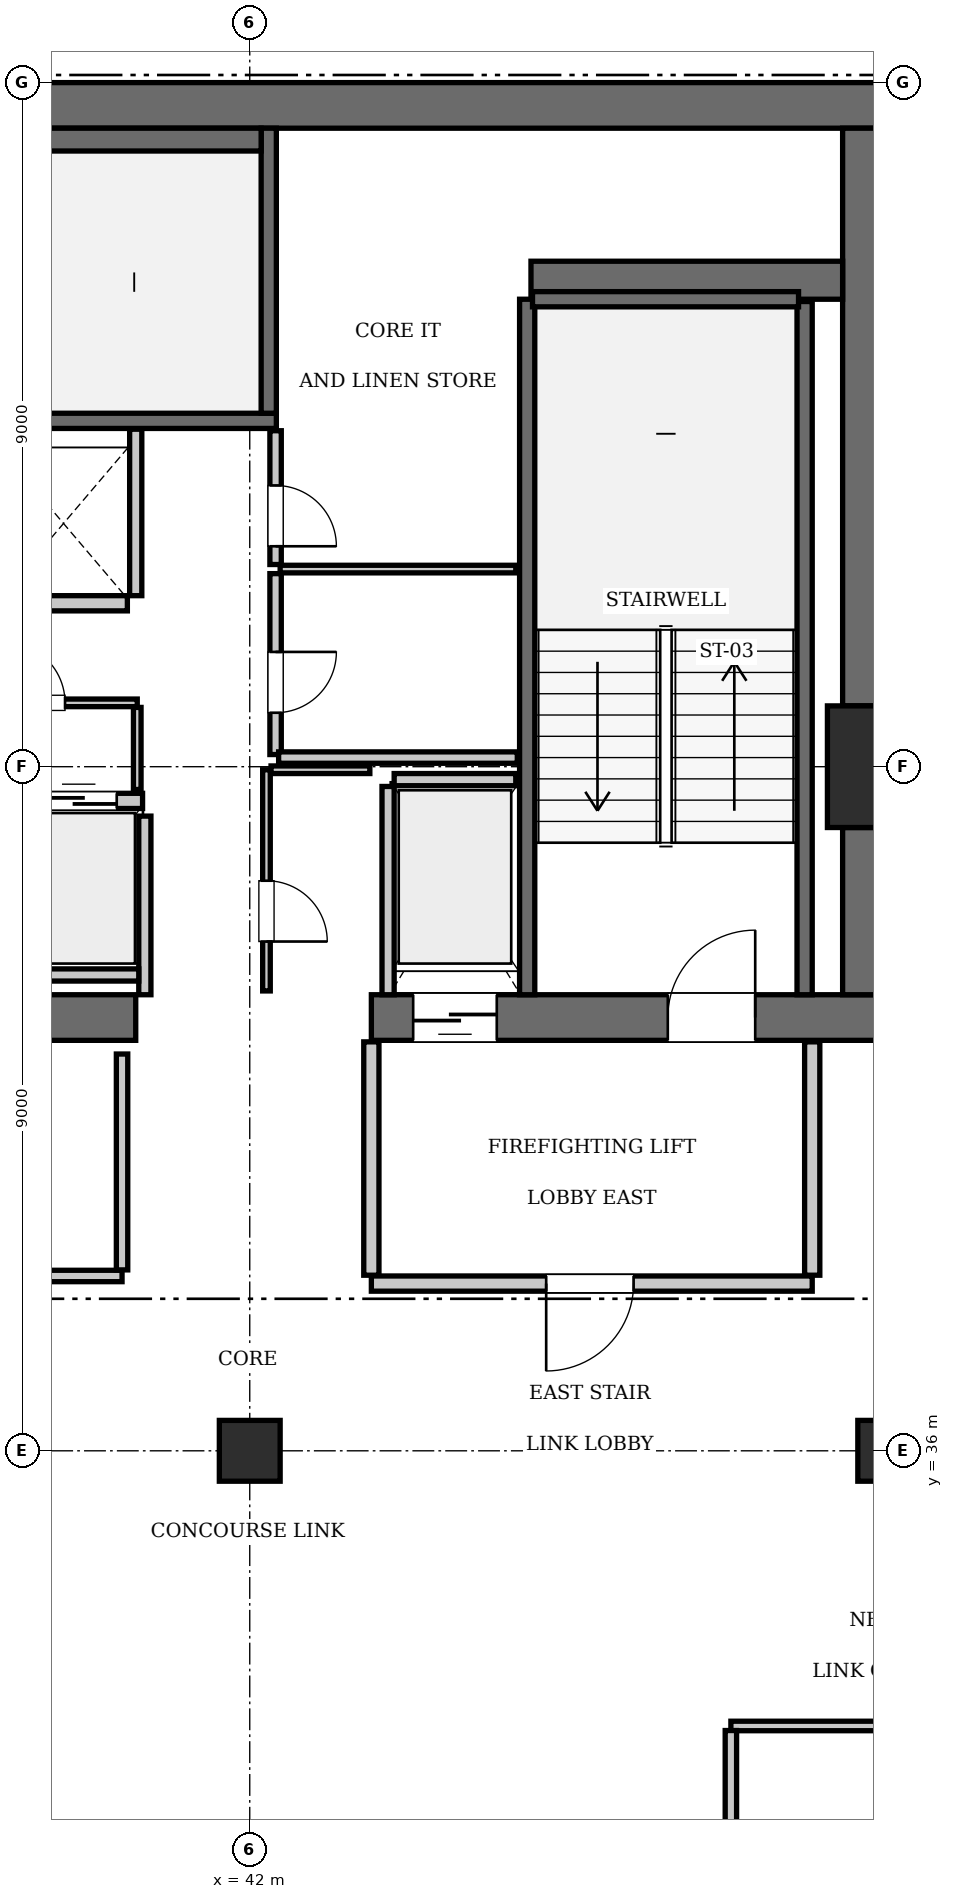
"""IFC4 building model, lengths in metres.
Left out: names, types, materials, properties, quantities, classifications, styles, units other than length and angle.
Written with IfcOpenShell. Run it as: python <this file> out.ifc"""

import sys

from ifc_helpers import new_model, si_unit, direction, frame, frame_2d, origin, origin_2d, place, context, subcontext, project, spatial, rectangle, extrude, element, fill, save


model = new_model("IFC4")
c1 = context("Model", 3, precision=1e-05, world=origin(), true_north=direction((0.0, 1.0)))
c2 = subcontext(c1, "Body", "Model", "MODEL_VIEW")
j1 = project(units=[si_unit("LENGTHUNIT", "METRE"), si_unit("PLANEANGLEUNIT", "RADIAN")], contexts=[c1])
p1 = place(None, origin())
s1 = spatial("IfcSite", under=j1, at=p1, CompositionType="ELEMENT")
p2 = place(p1, origin())
s2 = spatial("IfcBuilding", under=s1, at=p2, CompositionType="ELEMENT")
p3 = place(p2, frame((0.0, 0.0, 266.35)))
s3 = spatial("IfcBuildingStorey", under=s2, at=p3, CompositionType="ELEMENT", Elevation=266.35)
p4 = place(p3, frame((50.4, 45.0, 0.0), z_axis=(0.0, 0.0, 1.0), x_axis=(1.0, 0.0, 0.0)))
e1 = element("IfcColumn", 1, at=p4, inside=s3, PredefinedType="COLUMN", context=c2, shape_type="SweptSolid", body=[
    extrude(rectangle(XDim=1.6, YDim=1.6, at=origin_2d()), origin(), (0.0, 0.0, 1.0), 3.85),
])
p5 = place(p3, frame((25.2, 53.7, 0.0), z_axis=(0.0, 0.0, 1.0), x_axis=(1.0, 0.0, 0.0)))
e2 = element("IfcWall", 2, at=p5, inside=s3, PredefinedType="SHEAR", context=c2, shape_type="SweptSolid", body=[
    extrude(rectangle(XDim=25.2, YDim=0.6, at=frame_2d((12.6, 0.0))), origin(), (0.0, 0.0, 1.0), 3.85),
])
p6 = place(p3, frame((35.1, 41.7, 0.0), z_axis=(0.0, 0.0, 1.0), x_axis=(1.0, 0.0, 0.0)))
e3 = element("IfcWall", 3, at=p6, inside=s3, PredefinedType="SHEAR", context=c2, shape_type="SweptSolid", body=[
    extrude(rectangle(XDim=5.4, YDim=0.6, at=frame_2d((2.7, 0.0))), origin(), (0.0, 0.0, 1.0), 3.85),
])
p7 = place(p3, frame((43.6, 41.7, 0.0), z_axis=(0.0, 0.0, 1.0), x_axis=(1.0, 0.0, 0.0)))
e4 = element("IfcWall", 4, at=p7, inside=s3, PredefinedType="SHEAR", context=c2, shape_type="SweptSolid", body=[
    extrude(rectangle(XDim=6.8, YDim=0.6, at=frame_2d((3.4, 0.0))), origin(), (0.0, 0.0, 1.0), 3.85),
])
p8 = place(p7, frame((3.9, 0.0, 0.0)))
e5 = element("IfcOpeningElement", 5, at=p8, cuts=e4, PredefinedType="OPENING", context=c2, shape_type="SweptSolid", body=[
    extrude(rectangle(XDim=1.15, YDim=2.15, at=frame_2d((0.575, 1.075))), frame((0.0, 0.31, 0.0), z_axis=(0.0, -1.0, 0.0), x_axis=(1.0, 0.0, 0.0)), (0.0, 0.0, 1.0), 0.62),
])
p9 = place(p7, frame((0.55, 0.0, 0.0)))
e6 = element("IfcOpeningElement", 6, at=p9, cuts=e4, PredefinedType="OPENING", context=c2, shape_type="SweptSolid", body=[
    extrude(rectangle(XDim=1.1, YDim=2.2, at=frame_2d((0.55, 1.1))), frame((0.0, 0.31, 0.0), z_axis=(0.0, -1.0, 0.0), x_axis=(1.0, 0.0, 0.0)), (0.0, 0.0, 1.0), 0.62),
])
p10 = place(p3, frame((50.1, 42.0, 0.0), z_axis=(0.0, 0.0, 1.0), x_axis=(0.0, 1.0, 0.0)))
e7 = element("IfcWall", 7, at=p10, inside=s3, PredefinedType="SHEAR", context=c2, shape_type="SweptSolid", body=[
    extrude(rectangle(XDim=2.2, YDim=0.6, at=frame_2d((1.1, 0.0))), origin(), (0.0, 0.0, 1.0), 3.85),
])
p11 = place(p3, frame((50.1, 45.8, 0.0), z_axis=(0.0, 0.0, 1.0), x_axis=(0.0, 1.0, 0.0)))
e8 = element("IfcWall", 8, at=p11, inside=s3, PredefinedType="SHEAR", context=c2, shape_type="SweptSolid", body=[
    extrude(rectangle(XDim=7.6, YDim=0.6, at=frame_2d((3.8, 0.0))), origin(), (0.0, 0.0, 1.0), 3.85),
])
p12 = place(p3, frame((45.7, 51.4, 0.0), z_axis=(0.0, 0.0, 1.0), x_axis=(1.0, 0.0, 0.0)))
e9 = element("IfcWall", 9, at=p12, inside=s3, PredefinedType="SHEAR", context=c2, shape_type="SweptSolid", body=[
    extrude(rectangle(XDim=4.1, YDim=0.5, at=frame_2d((2.05, 0.0))), origin(), (0.0, 0.0, 1.0), 3.85),
])
for number, where, z_axis, x_axis in (
    (10, (42.0, 36.0, 0.0), (0.0, 0.0, 1.0), (1.0, 0.0, 0.0)),
    (11, (50.4, 36.0, 0.0), (0.0, 0.0, 1.0), (1.0, 0.0, 0.0)),
):
    element("IfcColumn", number, at=place(p3, frame(where, z_axis=z_axis, x_axis=x_axis)), inside=s3, PredefinedType="COLUMN", context=c2, shape_type="SweptSolid", body=[
        extrude(rectangle(XDim=0.8, YDim=0.8, at=origin_2d()), origin(), (0.0, 0.0, 1.0), 3.85),
    ])
p13 = place(p3, frame((33.25, 49.55, 0.0), z_axis=(0.0, 0.0, 1.0), x_axis=(1.0, 0.0, 0.0)))
e12 = element("IfcWall", 12, at=p13, inside=s3, PredefinedType="SOLIDWALL", context=c2, shape_type="SweptSolid", body=[
    extrude(rectangle(XDim=9.1, YDim=0.2, at=frame_2d((4.55, 0.0))), origin(), (0.0, 0.0, 1.0), 3.61),
])
p14 = place(p3, frame((42.25, 49.65, 0.0), z_axis=(0.0, 0.0, 1.0), x_axis=(0.0, 1.0, 0.0)))
e13 = element("IfcWall", 13, at=p14, inside=s3, PredefinedType="SOLIDWALL", context=c2, shape_type="SweptSolid", body=[
    extrude(rectangle(XDim=3.75, YDim=0.2, at=frame_2d((1.875, 0.0))), origin(), (0.0, 0.0, 1.0), 3.61),
])
p15 = place(p3, frame((33.45, 53.25, 0.0), z_axis=(0.0, 0.0, 1.0), x_axis=(1.0, 0.0, 0.0)))
e14 = element("IfcWall", 14, at=p15, inside=s3, PredefinedType="SOLIDWALL", context=c2, shape_type="SweptSolid", body=[
    extrude(rectangle(XDim=8.7, YDim=0.3, at=frame_2d((4.35, 0.0))), origin(), (0.0, 0.0, 1.0), 3.61),
])
p16 = place(p3, frame((45.65, 42.0, 0.0), z_axis=(0.0, 0.0, 1.0), x_axis=(0.0, 1.0, 0.0)))
e15 = element("IfcWall", 15, at=p16, inside=s3, PredefinedType="SOLIDWALL", context=c2, shape_type="SweptSolid", body=[
    extrude(rectangle(XDim=9.15, YDim=0.2, at=frame_2d((4.575, 0.0))), origin(), (0.0, 0.0, 1.0), 3.61),
])
p17 = place(p3, frame((49.3, 42.0, 0.0), z_axis=(0.0, 0.0, 1.0), x_axis=(0.0, 1.0, 0.0)))
e16 = element("IfcWall", 16, at=p17, inside=s3, PredefinedType="SOLIDWALL", context=c2, shape_type="SweptSolid", body=[
    extrude(rectangle(XDim=9.12, YDim=0.2, at=frame_2d((4.56, 0.0))), origin(), (0.0, 0.0, 1.0), 3.61),
])
p18 = place(p3, frame((45.72, 51.15, 0.0), z_axis=(0.0, 0.0, 1.0), x_axis=(1.0, 0.0, 0.0)))
e17 = element("IfcWall", 17, at=p18, inside=s3, PredefinedType="SOLIDWALL", context=c2, shape_type="SweptSolid", body=[
    extrude(rectangle(XDim=3.5, YDim=0.2, at=frame_2d((1.75, 0.0))), origin(), (0.0, 0.0, 1.0), 3.61),
])
p19 = place(p3, frame((38.91, 44.55, 0.0), z_axis=(0.0, 0.0, 1.0), x_axis=(1.0, 0.0, 0.0)))
e18 = element("IfcWall", 18, at=p19, inside=s3, PredefinedType="SOLIDWALL", context=c2, shape_type="SweptSolid", body=[
    extrude(rectangle(XDim=1.68, YDim=0.2, at=frame_2d((0.84, 0.0))), origin(), (0.0, 0.0, 1.0), 3.61),
])
p20 = place(p19, frame((0.34, 0.0, 0.0)))
e19 = element("IfcOpeningElement", 19, at=p20, cuts=e18, PredefinedType="OPENING", context=c2, shape_type="SweptSolid", body=[
    extrude(rectangle(XDim=1.0, YDim=2.15, at=frame_2d((0.5, 1.075))), frame((0.0, 0.11, 0.0), z_axis=(0.0, -1.0, 0.0), x_axis=(1.0, 0.0, 0.0)), (0.0, 0.0, 1.0), 0.22),
])
p21 = place(p3, frame((38.71, 47.15, 0.0), z_axis=(0.0, 0.0, 1.0), x_axis=(1.0, 0.0, 0.0)))
e20 = element("IfcWall", 20, at=p21, inside=s3, PredefinedType="SOLIDWALL", context=c2, shape_type="SweptSolid", body=[
    extrude(rectangle(XDim=1.68, YDim=0.2, at=frame_2d((0.84, 0.0))), origin(), (0.0, 0.0, 1.0), 3.61),
])
p22 = place(p3, frame((43.9, 44.83, 0.0), z_axis=(0.0, 0.0, 1.0), x_axis=(1.0, 0.0, 0.0)))
e21 = element("IfcWall", 21, at=p22, inside=s3, PredefinedType="SOLIDWALL", context=c2, shape_type="SweptSolid", body=[
    extrude(rectangle(XDim=1.6, YDim=0.16, at=frame_2d((0.8, 0.0))), origin(), (0.0, 0.0, 1.0), 3.61),
])
p23 = place(p3, frame((43.82, 42.0, 0.0), z_axis=(0.0, 0.0, 1.0), x_axis=(0.0, 1.0, 0.0)))
e22 = element("IfcWall", 22, at=p23, inside=s3, PredefinedType="SOLIDWALL", context=c2, shape_type="SweptSolid", body=[
    extrude(rectangle(XDim=2.74, YDim=0.16, at=frame_2d((1.37, 0.0))), origin(), (0.0, 0.0, 1.0), 3.61),
])
p24 = place(p3, frame((40.62, 42.0, 0.0), z_axis=(0.0, 0.0, 1.0), x_axis=(0.0, 1.0, 0.0)))
e23 = element("IfcWall", 23, at=p24, inside=s3, PredefinedType="SOLIDWALL", context=c2, shape_type="SweptSolid", body=[
    extrude(rectangle(XDim=2.35, YDim=0.16, at=frame_2d((1.175, 0.0))), origin(), (0.0, 0.0, 1.0), 3.61),
])
p25 = place(p3, frame((35.52, 42.26, 0.0), z_axis=(0.0, 0.0, 1.0), x_axis=(1.0, 0.0, 0.0)))
e24 = element("IfcWall", 24, at=p25, inside=s3, PredefinedType="SOLIDWALL", context=c2, shape_type="SweptSolid", body=[
    extrude(rectangle(XDim=5.02, YDim=0.16, at=frame_2d((2.51, 0.0))), origin(), (0.0, 0.0, 1.0), 3.61),
])
p26 = place(p3, frame((40.5, 47.25, 0.0), z_axis=(0.0, 0.0, 1.0), x_axis=(0.0, 1.0, 0.0)))
e25 = element("IfcWall", 25, at=p26, inside=s3, PredefinedType="SOLIDWALL", context=c2, shape_type="SweptSolid", body=[
    extrude(rectangle(XDim=2.19, YDim=0.16, at=frame_2d((1.095, 0.0))), origin(), (0.0, 0.0, 1.0), 3.61),
])
p27 = place(p3, frame((43.6, 38.2, 0.0), z_axis=(0.0, 0.0, 1.0), x_axis=(1.0, 0.0, 0.0)))
e26 = element("IfcWall", 26, at=p27, inside=s3, PredefinedType="PARTITIONING", context=c2, shape_type="SweptSolid", body=[
    extrude(rectangle(XDim=5.8, YDim=0.2, at=frame_2d((2.9, 0.0))), origin(), (0.0, 0.0, 1.0), 3.61),
])
p28 = place(p27, frame((2.3, 0.0, 0.0)))
e27 = element("IfcOpeningElement", 27, at=p28, cuts=e26, PredefinedType="OPENING", context=c2, shape_type="SweptSolid", body=[
    extrude(rectangle(XDim=1.15, YDim=2.15, at=frame_2d((0.575, 1.075))), frame((0.0, 0.11, 0.0), z_axis=(0.0, -1.0, 0.0), x_axis=(1.0, 0.0, 0.0)), (0.0, 0.0, 1.0), 0.22),
])
for number, where, z_axis, x_axis in (
    (28, (43.6, 38.31, 0.0), (0.0, 0.0, 1.0), (0.0, 1.0, 0.0)),
    (29, (49.4, 38.31, 0.0), (0.0, 0.0, 1.0), (0.0, 1.0, 0.0)),
):
    element("IfcWall", number, at=place(p3, frame(where, z_axis=z_axis, x_axis=x_axis)), inside=s3, PredefinedType="PARTITIONING", context=c2, shape_type="SweptSolid", body=[
        extrude(rectangle(XDim=3.07, YDim=0.2, at=frame_2d((1.535, 0.0))), origin(), (0.0, 0.0, 1.0), 3.61),
    ])
p29 = place(p3, frame((38.02, 45.84, 0.0), z_axis=(0.0, 0.0, 1.0), x_axis=(1.0, 0.0, 0.0)))
e30 = element("IfcWall", 30, at=p29, inside=s3, PredefinedType="PARTITIONING", context=c2, shape_type="SweptSolid", body=[
    extrude(rectangle(XDim=2.5, YDim=0.1, at=frame_2d((1.25, 0.0))), origin(), (0.0, 0.0, 1.0), 3.61),
])
p30 = place(p29, frame((0.75, 0.0, 0.0)))
e31 = element("IfcOpeningElement", 31, at=p30, cuts=e30, PredefinedType="OPENING", context=c2, shape_type="SweptSolid", body=[
    extrude(rectangle(XDim=0.8, YDim=2.05, at=frame_2d((0.4, 1.025))), frame((0.0, 0.06, 0.0), z_axis=(0.0, -1.0, 0.0), x_axis=(1.0, 0.0, 0.0)), (0.0, 0.0, 1.0), 0.12),
])
p31 = place(p3, frame((40.52, 44.7, 0.0), z_axis=(0.0, 0.0, 1.0), x_axis=(0.0, 1.0, 0.0)))
e32 = element("IfcWall", 32, at=p31, inside=s3, PredefinedType="PARTITIONING", context=c2, shape_type="SweptSolid", body=[
    extrude(rectangle(XDim=1.08, YDim=0.1, at=frame_2d((0.54, 0.0))), origin(), (0.0, 0.0, 1.0), 3.61),
])
p32 = place(p3, frame((42.22, 42.05, 0.0), z_axis=(0.0, 0.0, 1.0), x_axis=(0.0, 1.0, 0.0)))
e33 = element("IfcWall", 33, at=p32, inside=s3, PredefinedType="PARTITIONING", context=c2, shape_type="SweptSolid", body=[
    extrude(rectangle(XDim=2.91, YDim=0.1, at=frame_2d((1.455, 0.0))), origin(), (0.0, 0.0, 1.0), 3.61),
])
p33 = place(p32, frame((0.65, 0.0, 0.0)))
e34 = element("IfcOpeningElement", 34, at=p33, cuts=e33, PredefinedType="OPENING", context=c2, shape_type="SweptSolid", body=[
    extrude(rectangle(XDim=0.8, YDim=2.05, at=frame_2d((0.4, 1.025))), frame((0.0, 0.06, 0.0), z_axis=(0.0, -1.0, 0.0), x_axis=(1.0, 0.0, 0.0)), (0.0, 0.0, 1.0), 0.12),
])
p34 = place(p3, frame((42.28, 44.96, 0.0), z_axis=(0.0, 0.0, 1.0), x_axis=(1.0, 0.0, 0.0)))
e35 = element("IfcWall", 35, at=p34, inside=s3, PredefinedType="PARTITIONING", context=c2, shape_type="SweptSolid", body=[
    extrude(rectangle(XDim=1.3, YDim=0.1, at=frame_2d((0.65, 0.0))), origin(), (0.0, 0.0, 1.0), 3.61),
])
p35 = place(p3, frame((42.34, 45.16, 0.0), z_axis=(0.0, 0.0, 1.0), x_axis=(0.0, 1.0, 0.0)))
e36 = element("IfcWall", 36, at=p35, inside=s3, PredefinedType="PARTITIONING", context=c2, shape_type="SweptSolid", body=[
    extrude(rectangle(XDim=2.38, YDim=0.15, at=frame_2d((1.19, 0.0))), origin(), (0.0, 0.0, 1.0), 3.61),
])
p36 = place(p35, frame((0.55, 0.0, 0.0)))
e37 = element("IfcOpeningElement", 37, at=p36, cuts=e36, PredefinedType="OPENING", context=c2, shape_type="SweptSolid", body=[
    extrude(rectangle(XDim=0.8, YDim=2.05, at=frame_2d((0.4, 1.025))), frame((0.0, 0.085, 0.0), z_axis=(0.0, -1.0, 0.0), x_axis=(1.0, 0.0, 0.0)), (0.0, 0.0, 1.0), 0.17),
])
p37 = place(p3, frame((42.34, 47.66, 0.0), z_axis=(0.0, 0.0, 1.0), x_axis=(0.0, 1.0, 0.0)))
e38 = element("IfcWall", 38, at=p37, inside=s3, PredefinedType="PARTITIONING", context=c2, shape_type="SweptSolid", body=[
    extrude(rectangle(XDim=1.76, YDim=0.15, at=frame_2d((0.88, 0.0))), origin(), (0.0, 0.0, 1.0), 3.61),
])
p38 = place(p37, frame((0.24, 0.0, 0.0)))
e39 = element("IfcOpeningElement", 39, at=p38, cuts=e38, PredefinedType="OPENING", context=c2, shape_type="SweptSolid", body=[
    extrude(rectangle(XDim=0.8, YDim=2.05, at=frame_2d((0.4, 1.025))), frame((0.0, 0.085, 0.0), z_axis=(0.0, -1.0, 0.0), x_axis=(1.0, 0.0, 0.0)), (0.0, 0.0, 1.0), 0.17),
])
p39 = place(p3, frame((42.4, 47.6, 0.0), z_axis=(0.0, 0.0, 1.0), x_axis=(1.0, 0.0, 0.0)))
e40 = element("IfcWall", 40, at=p39, inside=s3, PredefinedType="PARTITIONING", context=c2, shape_type="SweptSolid", body=[
    extrude(rectangle(XDim=3.1, YDim=0.1, at=frame_2d((1.55, 0.0))), origin(), (0.0, 0.0, 1.0), 3.61),
])
p40 = place(p3, frame((42.38, 45.12, 0.0), z_axis=(0.0, 0.0, 1.0), x_axis=(1.0, 0.0, 0.0)))
e41 = element("IfcWall", 41, at=p40, inside=s3, PredefinedType="PARTITIONING", context=c2, shape_type="SweptSolid", body=[
    extrude(rectangle(XDim=3.14, YDim=0.15, at=frame_2d((1.57, 0.0))), origin(), (0.0, 0.0, 1.0), 3.61),
])
p41 = place(p3, frame((37.38, 38.3, 0.0), z_axis=(0.0, 0.0, 1.0), x_axis=(1.0, 0.0, 0.0)))
e42 = element("IfcWall", 42, at=p41, inside=s3, PredefinedType="PARTITIONING", context=c2, shape_type="SweptSolid", body=[
    extrude(rectangle(XDim=2.94, YDim=0.15, at=frame_2d((1.47, 0.0))), origin(), (0.0, 0.0, 1.0), 3.61),
])
p42 = place(p41, frame((1.0, 0.0, 0.0)))
e43 = element("IfcOpeningElement", 43, at=p42, cuts=e42, PredefinedType="OPENING", context=c2, shape_type="SweptSolid", body=[
    extrude(rectangle(XDim=0.8, YDim=2.05, at=frame_2d((0.4, 1.025))), frame((0.0, 0.085, 0.0), z_axis=(0.0, -1.0, 0.0), x_axis=(1.0, 0.0, 0.0)), (0.0, 0.0, 1.0), 0.17),
])
p43 = place(p3, frame((40.32, 38.38, 0.0), z_axis=(0.0, 0.0, 1.0), x_axis=(0.0, 1.0, 0.0)))
e44 = element("IfcWall", 44, at=p43, inside=s3, PredefinedType="PARTITIONING", context=c2, shape_type="SweptSolid", body=[
    extrude(rectangle(XDim=2.84, YDim=0.15, at=frame_2d((1.42, 0.0))), origin(), (0.0, 0.0, 1.0), 3.61),
])
p44 = place(p3, frame((48.33, 32.38, 0.0), z_axis=(0.0, 0.0, 1.0), x_axis=(1.0, 0.0, 0.0)))
e45 = element("IfcWall", 45, at=p44, inside=s3, PredefinedType="PARTITIONING", context=c2, shape_type="SweptSolid", body=[
    extrude(rectangle(XDim=11.77, YDim=0.125, at=frame_2d((5.885, 0.0))), origin(), (0.0, 0.0, 1.0), 3.61),
])
p45 = place(p3, frame((48.33, 30.24, 0.0), z_axis=(0.0, 0.0, 1.0), x_axis=(0.0, 1.0, 0.0)))
e46 = element("IfcWall", 46, at=p45, inside=s3, PredefinedType="PARTITIONING", context=c2, shape_type="SweptSolid", body=[
    extrude(rectangle(XDim=2.08, YDim=0.15, at=frame_2d((1.04, 0.0))), origin(), (0.0, 0.0, 1.0), 3.61),
])
p46 = place(p8, origin())
e47 = element("IfcDoor", 47, at=p46, inside=s3, OperationType="SINGLE_SWING_RIGHT", PredefinedType="DOOR", context=c2, shape_type="SweptSolid", body=[
    extrude(rectangle(XDim=1.15, YDim=2.15, at=frame_2d((0.575, 1.075))), frame((0.0, 0.025, 0.0), z_axis=(0.0, -1.0, 0.0), x_axis=(1.0, 0.0, 0.0)), (0.0, 0.0, 1.0), 0.05),
])
fill(e5, e47)
p47 = place(p20, origin())
e48 = element("IfcDoor", 48, at=p47, inside=s3, OperationType="SLIDING_TO_LEFT", PredefinedType="DOOR", context=c2, shape_type="SweptSolid", body=[
    extrude(rectangle(XDim=1.0, YDim=2.15, at=frame_2d((0.5, 1.075))), frame((0.0, 0.025, 0.0), z_axis=(0.0, -1.0, 0.0), x_axis=(1.0, 0.0, 0.0)), (0.0, 0.0, 1.0), 0.05),
])
fill(e19, e48)
p48 = place(p9, frame((1.1, 0.0, 0.0), z_axis=(0.0, 0.0, 1.0), x_axis=(-1.0, 0.0, 0.0)))
e49 = element("IfcDoor", 49, at=p48, inside=s3, OperationType="SLIDING_TO_LEFT", PredefinedType="DOOR", context=c2, shape_type="SweptSolid", body=[
    extrude(rectangle(XDim=1.1, YDim=2.2, at=frame_2d((0.55, 1.1))), frame((0.0, 0.025, 0.0), z_axis=(0.0, -1.0, 0.0), x_axis=(1.0, 0.0, 0.0)), (0.0, 0.0, 1.0), 0.05),
])
fill(e6, e49)
p49 = place(p28, frame((1.15, 0.0, 0.0), z_axis=(0.0, 0.0, 1.0), x_axis=(-1.0, 0.0, 0.0)))
e50 = element("IfcDoor", 50, at=p49, inside=s3, OperationType="SINGLE_SWING_RIGHT", PredefinedType="DOOR", context=c2, shape_type="SweptSolid", body=[
    extrude(rectangle(XDim=1.15, YDim=2.15, at=frame_2d((0.575, 1.075))), frame((0.0, 0.025, 0.0), z_axis=(0.0, -1.0, 0.0), x_axis=(1.0, 0.0, 0.0)), (0.0, 0.0, 1.0), 0.05),
])
fill(e27, e50)
p50 = place(p30, origin())
e51 = element("IfcDoor", 51, at=p50, inside=s3, OperationType="SINGLE_SWING_LEFT", PredefinedType="DOOR", context=c2, shape_type="SweptSolid", body=[
    extrude(rectangle(XDim=0.8, YDim=2.05, at=frame_2d((0.4, 1.025))), frame((0.0, 0.025, 0.0), z_axis=(0.0, -1.0, 0.0), x_axis=(1.0, 0.0, 0.0)), (0.0, 0.0, 1.0), 0.05),
])
fill(e31, e51)
p51 = place(p33, frame((0.8, 0.0, 0.0), z_axis=(0.0, 0.0, 1.0), x_axis=(-1.0, 0.0, 0.0)))
e52 = element("IfcDoor", 52, at=p51, inside=s3, OperationType="SINGLE_SWING_RIGHT", PredefinedType="DOOR", context=c2, shape_type="SweptSolid", body=[
    extrude(rectangle(XDim=0.8, YDim=2.05, at=frame_2d((0.4, 1.025))), frame((0.0, 0.025, 0.0), z_axis=(0.0, -1.0, 0.0), x_axis=(1.0, 0.0, 0.0)), (0.0, 0.0, 1.0), 0.05),
])
fill(e34, e52)
p52 = place(p36, frame((0.8, 0.0, 0.0), z_axis=(0.0, 0.0, 1.0), x_axis=(-1.0, 0.0, 0.0)))
e53 = element("IfcDoor", 53, at=p52, inside=s3, OperationType="SINGLE_SWING_LEFT", PredefinedType="DOOR", context=c2, shape_type="SweptSolid", body=[
    extrude(rectangle(XDim=0.8, YDim=2.05, at=frame_2d((0.4, 1.025))), frame((0.0, 0.025, 0.0), z_axis=(0.0, -1.0, 0.0), x_axis=(1.0, 0.0, 0.0)), (0.0, 0.0, 1.0), 0.05),
])
fill(e37, e53)
p53 = place(p38, frame((0.8, 0.0, 0.0), z_axis=(0.0, 0.0, 1.0), x_axis=(-1.0, 0.0, 0.0)))
e54 = element("IfcDoor", 54, at=p53, inside=s3, OperationType="SINGLE_SWING_RIGHT", PredefinedType="DOOR", context=c2, shape_type="SweptSolid", body=[
    extrude(rectangle(XDim=0.8, YDim=2.05, at=frame_2d((0.4, 1.025))), frame((0.0, 0.025, 0.0), z_axis=(0.0, -1.0, 0.0), x_axis=(1.0, 0.0, 0.0)), (0.0, 0.0, 1.0), 0.05),
])
fill(e39, e54)
save(model, sys.argv[1])
